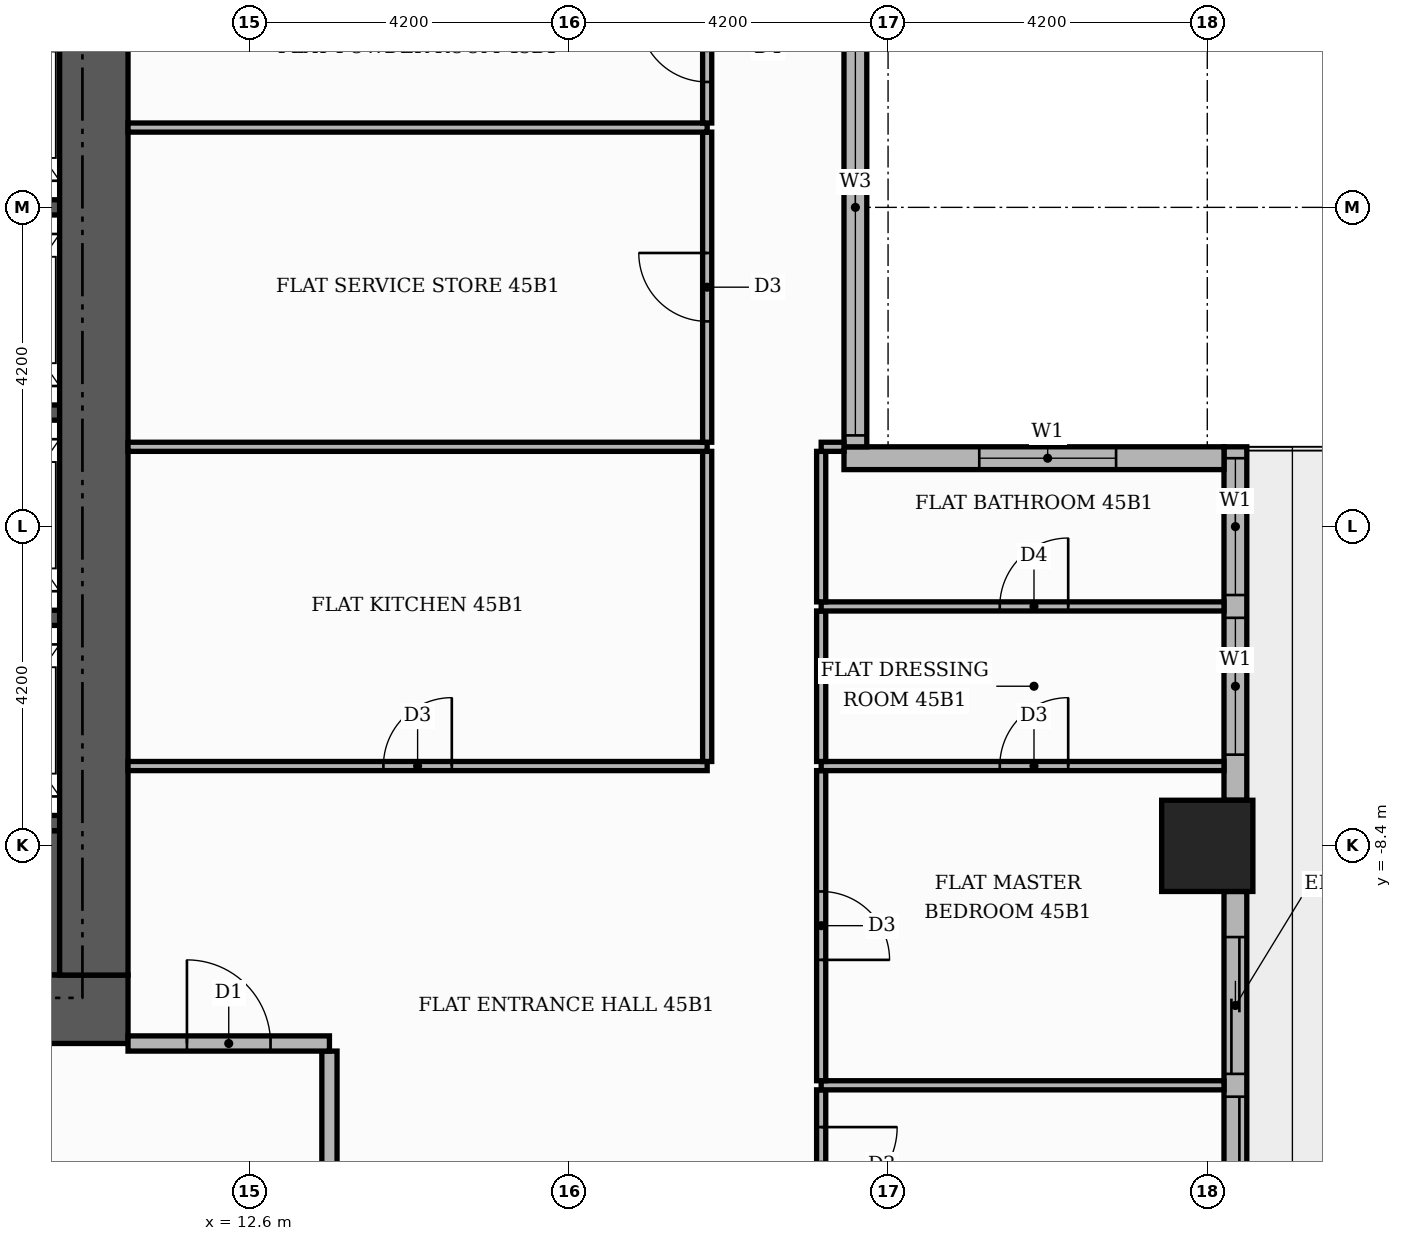
"""IFC4 building model, lengths in metres.
Left out: names, types, materials, properties, quantities, classifications, styles, units other than length and angle.
Written with IfcOpenShell. Run it as: python <this file> out.ifc"""

import sys

from ifc_helpers import new_model, si_unit, direction, frame, frame_2d, origin, origin_2d, place, context, subcontext, project, spatial, rectangle, extrude, element, fill, save


model = new_model("IFC4")
c1 = context("Model", 3, precision=1e-05, world=origin(), true_north=direction((0.0, 1.0)))
c2 = subcontext(c1, "Body", "Model", "MODEL_VIEW")
j1 = project(units=[si_unit("LENGTHUNIT", "METRE"), si_unit("PLANEANGLEUNIT", "RADIAN")], contexts=[c1])
p1 = place(None, origin())
s1 = spatial("IfcSite", under=j1, at=p1, CompositionType="ELEMENT")
p2 = place(p1, origin())
s2 = spatial("IfcBuilding", under=s1, at=p2, CompositionType="ELEMENT")
p3 = place(p2, frame((0.0, 0.0, 192.3)))
s3 = spatial("IfcBuildingStorey", under=s2, at=p3, CompositionType="ELEMENT", Elevation=192.3)
p4 = place(p3, frame((5.5, -9.15, 0.0), z_axis=(0.0, 0.0, 1.0), x_axis=(1.0, 0.0, 0.0)))
e1 = element("IfcWall", 1, at=p4, inside=s3, PredefinedType="SHEAR", context=c2, shape_type="SweptSolid", body=[
    extrude(rectangle(XDim=4.6, YDim=1.9, at=frame_2d((2.3, 0.0))), origin(), (0.0, 0.0, 1.0), 3.48),
])
for number, where, z_axis, x_axis in (
    (2, (8.1, -8.1, 0.0), (0.0, 0.0, 1.0), (1.0, 0.0, 0.0)),
    (3, (8.1, -5.4, 0.0), (0.0, 0.0, 1.0), (1.0, 0.0, 0.0)),
    (4, (8.1, -2.7, 0.0), (0.0, 0.0, 1.0), (1.0, 0.0, 0.0)),
    (5, (8.1, 0.0, 0.0), (0.0, 0.0, 1.0), (1.0, 0.0, 0.0)),
):
    element("IfcWall", number, at=place(p3, frame(where, z_axis=z_axis, x_axis=x_axis)), inside=s3, PredefinedType="SHEAR", context=c2, shape_type="SweptSolid", body=[
        extrude(rectangle(XDim=2.0, YDim=0.2, at=frame_2d((1.0, 0.0))), origin(), (0.0, 0.0, 1.0), 3.48),
    ])
p5 = place(p3, frame((-11.0, -10.55, 0.0), z_axis=(0.0, 0.0, 1.0), x_axis=(1.0, 0.0, 0.0)))
e6 = element("IfcWall", 6, at=p5, inside=s3, PredefinedType="SHEAR", context=c2, shape_type="SweptSolid", body=[
    extrude(rectangle(XDim=22.0, YDim=0.9, at=frame_2d((11.0, 0.0))), origin(), (0.0, 0.0, 1.0), 3.48),
])
p6 = place(p5, frame((7.4, 0.0, 0.0)))
e7 = element("IfcOpeningElement", 7, at=p6, cuts=e6, PredefinedType="OPENING", context=c2, shape_type="SweptSolid", body=[
    extrude(rectangle(XDim=1.8, YDim=2.2, at=frame_2d((0.9, 1.1))), frame((0.0, 0.46, 0.0), z_axis=(0.0, -1.0, 0.0), x_axis=(1.0, 0.0, 0.0)), (0.0, 0.0, 1.0), 0.92),
])
p7 = place(p3, frame((10.55, -10.1, 0.0), z_axis=(0.0, 0.0, 1.0), x_axis=(0.0, 1.0, 0.0)))
e8 = element("IfcWall", 8, at=p7, inside=s3, PredefinedType="SHEAR", context=c2, shape_type="SweptSolid", body=[
    extrude(rectangle(XDim=20.2, YDim=0.9, at=frame_2d((10.1, 0.0))), origin(), (0.0, 0.0, 1.0), 3.48),
])
p8 = place(p3, frame((25.2, -8.4, 0.0), z_axis=(0.0, 0.0, 1.0), x_axis=(1.0, 0.0, 0.0)))
e9 = element("IfcColumn", 9, at=p8, inside=s3, PredefinedType="COLUMN", context=c2, shape_type="SweptSolid", body=[
    extrude(rectangle(XDim=1.2, YDim=1.2, at=origin_2d()), origin(), (0.0, 0.0, 1.0), 3.9),
])
p9 = place(p3, frame((25.57, -16.2, 0.0), z_axis=(0.0, 0.0, 1.0), x_axis=(0.0, 1.0, 0.0)))
e10 = element("IfcWall", 10, at=p9, inside=s3, PredefinedType="STANDARD", context=c2, shape_type="SweptSolid", body=[
    extrude(rectangle(XDim=7.2, YDim=0.3, at=frame_2d((3.6, 0.0))), origin(), (0.0, 0.0, 1.0), 3.48),
])
p10 = place(p9, frame((0.6, 0.0, 0.0)))
e11 = element("IfcOpeningElement", 11, at=p10, cuts=e10, PredefinedType="OPENING", context=c2, shape_type="SweptSolid", body=[
    extrude(rectangle(XDim=3.9, YDim=2.4, at=frame_2d((1.95, 1.2))), frame((0.0, 0.16, 0.0), z_axis=(0.0, -1.0, 0.0), x_axis=(1.0, 0.0, 0.0)), (0.0, 0.0, 1.0), 0.32),
])
p11 = place(p9, frame((4.8, 0.0, 0.0)))
e12 = element("IfcOpeningElement", 12, at=p11, cuts=e10, PredefinedType="OPENING", context=c2, shape_type="SweptSolid", body=[
    extrude(rectangle(XDim=1.8, YDim=2.4, at=frame_2d((0.9, 1.2))), frame((0.0, 0.16, 0.0), z_axis=(0.0, -1.0, 0.0), x_axis=(1.0, 0.0, 0.0)), (0.0, 0.0, 1.0), 0.32),
])
p12 = place(p3, frame((25.57, -7.8, 0.0), z_axis=(0.0, 0.0, 1.0), x_axis=(0.0, 1.0, 0.0)))
e13 = element("IfcWall", 13, at=p12, inside=s3, PredefinedType="STANDARD", context=c2, shape_type="SweptSolid", body=[
    extrude(rectangle(XDim=4.65, YDim=0.3, at=frame_2d((2.325, 0.0))), origin(), (0.0, 0.0, 1.0), 3.48),
])
p13 = place(p12, frame((0.6, 0.0, 0.9)))
e14 = element("IfcOpeningElement", 14, at=p13, cuts=e13, PredefinedType="OPENING", context=c2, shape_type="SweptSolid", body=[
    extrude(rectangle(XDim=1.8, YDim=2.1, at=frame_2d((0.9, 1.05))), frame((0.0, 0.16, 0.0), z_axis=(0.0, -1.0, 0.0), x_axis=(1.0, 0.0, 0.0)), (0.0, 0.0, 1.0), 0.32),
])
p14 = place(p12, frame((2.7, 0.0, 0.9)))
e15 = element("IfcOpeningElement", 15, at=p14, cuts=e13, PredefinedType="OPENING", context=c2, shape_type="SweptSolid", body=[
    extrude(rectangle(XDim=1.8, YDim=2.1, at=frame_2d((0.9, 1.05))), frame((0.0, 0.16, 0.0), z_axis=(0.0, -1.0, 0.0), x_axis=(1.0, 0.0, 0.0)), (0.0, 0.0, 1.0), 0.32),
])
p15 = place(p3, frame((25.42, -3.3, 0.0), z_axis=(0.0, 0.0, 1.0), x_axis=(-1.0, 0.0, 0.0)))
e16 = element("IfcWall", 16, at=p15, inside=s3, PredefinedType="STANDARD", context=c2, shape_type="SweptSolid", body=[
    extrude(rectangle(XDim=5.0, YDim=0.3, at=frame_2d((2.5, 0.0))), origin(), (0.0, 0.0, 1.0), 3.48),
])
p16 = place(p15, frame((1.42, 0.0, 0.9)))
e17 = element("IfcOpeningElement", 17, at=p16, cuts=e16, PredefinedType="OPENING", context=c2, shape_type="SweptSolid", body=[
    extrude(rectangle(XDim=1.8, YDim=2.1, at=frame_2d((0.9, 1.05))), frame((0.0, 0.16, 0.0), z_axis=(0.0, -1.0, 0.0), x_axis=(1.0, 0.0, 0.0)), (0.0, 0.0, 1.0), 0.32),
])
p17 = place(p3, frame((20.57, -3.15, 0.0), z_axis=(0.0, 0.0, 1.0), x_axis=(0.0, 1.0, 0.0)))
e18 = element("IfcWall", 18, at=p17, inside=s3, PredefinedType="STANDARD", context=c2, shape_type="SweptSolid", body=[
    extrude(rectangle(XDim=6.6, YDim=0.3, at=frame_2d((3.3, 0.0))), origin(), (0.0, 0.0, 1.0), 3.48),
])
p18 = place(p17, frame((0.15, 0.0, 0.9)))
e19 = element("IfcOpeningElement", 19, at=p18, cuts=e18, PredefinedType="OPENING", context=c2, shape_type="SweptSolid", body=[
    extrude(rectangle(XDim=6.0, YDim=2.1, at=frame_2d((3.0, 1.05))), frame((0.0, 0.16, 0.0), z_axis=(0.0, -1.0, 0.0), x_axis=(1.0, 0.0, 0.0)), (0.0, 0.0, 1.0), 0.32),
])
p19 = place(p3, frame((20.12, -13.59, 0.0), z_axis=(0.0, 0.0, 1.0), x_axis=(0.0, 1.0, 0.0)))
e20 = element("IfcWall", 20, at=p19, inside=s3, PredefinedType="PARTITIONING", context=c2, shape_type="SweptSolid", body=[
    extrude(rectangle(XDim=1.98, YDim=0.12, at=frame_2d((0.99, 0.0))), origin(), (0.0, 0.0, 1.0), 3.48),
])
p20 = place(p19, frame((0.49, 0.0, 0.0)))
e21 = element("IfcOpeningElement", 21, at=p20, cuts=e20, PredefinedType="OPENING", context=c2, shape_type="SweptSolid", body=[
    extrude(rectangle(XDim=1.0, YDim=2.1, at=frame_2d((0.5, 1.05))), frame((0.0, 0.07, 0.0), z_axis=(0.0, -1.0, 0.0), x_axis=(1.0, 0.0, 0.0)), (0.0, 0.0, 1.0), 0.14),
])
p21 = place(p3, frame((13.65, -13.55, 0.0), z_axis=(0.0, 0.0, 1.0), x_axis=(0.0, 1.0, 0.0)))
e22 = element("IfcWall", 22, at=p21, inside=s3, PredefinedType="PARTITIONING", context=c2, shape_type="SweptSolid", body=[
    extrude(rectangle(XDim=2.45, YDim=0.2, at=frame_2d((1.225, 0.0))), origin(), (0.0, 0.0, 1.0), 3.48),
])
p22 = place(p3, frame((20.12, -11.55, 0.0), z_axis=(0.0, 0.0, 1.0), x_axis=(1.0, 0.0, 0.0)))
e23 = element("IfcWall", 23, at=p22, inside=s3, PredefinedType="PARTITIONING", context=c2, shape_type="SweptSolid", body=[
    extrude(rectangle(XDim=5.3, YDim=0.12, at=frame_2d((2.65, 0.0))), origin(), (0.0, 0.0, 1.0), 3.48),
])
p23 = place(p3, frame((20.12, -11.49, 0.0), z_axis=(0.0, 0.0, 1.0), x_axis=(0.0, 1.0, 0.0)))
e24 = element("IfcWall", 24, at=p23, inside=s3, PredefinedType="PARTITIONING", context=c2, shape_type="SweptSolid", body=[
    extrude(rectangle(XDim=4.08, YDim=0.12, at=frame_2d((2.04, 0.0))), origin(), (0.0, 0.0, 1.0), 3.48),
])
p24 = place(p23, frame((1.59, 0.0, 0.0)))
e25 = element("IfcOpeningElement", 25, at=p24, cuts=e24, PredefinedType="OPENING", context=c2, shape_type="SweptSolid", body=[
    extrude(rectangle(XDim=0.9, YDim=2.1, at=frame_2d((0.45, 1.05))), frame((0.0, 0.07, 0.0), z_axis=(0.0, -1.0, 0.0), x_axis=(1.0, 0.0, 0.0)), (0.0, 0.0, 1.0), 0.14),
])
p25 = place(p3, frame((11.0, -11.0, 0.0), z_axis=(0.0, 0.0, 1.0), x_axis=(1.0, 0.0, 0.0)))
e26 = element("IfcWall", 26, at=p25, inside=s3, PredefinedType="PARTITIONING", context=c2, shape_type="SweptSolid", body=[
    extrude(rectangle(XDim=2.65, YDim=0.2, at=frame_2d((1.325, 0.0))), origin(), (0.0, 0.0, 1.0), 3.48),
])
p26 = place(p25, frame((0.775, 0.0, 0.0)))
e27 = element("IfcOpeningElement", 27, at=p26, cuts=e26, PredefinedType="OPENING", context=c2, shape_type="SweptSolid", body=[
    extrude(rectangle(XDim=1.1, YDim=2.4, at=frame_2d((0.55, 1.2))), frame((0.0, 0.11, 0.0), z_axis=(0.0, -1.0, 0.0), x_axis=(1.0, 0.0, 0.0)), (0.0, 0.0, 1.0), 0.22),
])
p27 = place(p3, frame((11.0, -7.35, 0.0), z_axis=(0.0, 0.0, 1.0), x_axis=(1.0, 0.0, 0.0)))
e28 = element("IfcWall", 28, at=p27, inside=s3, PredefinedType="PARTITIONING", context=c2, shape_type="SweptSolid", body=[
    extrude(rectangle(XDim=7.62, YDim=0.12, at=frame_2d((3.81, 0.0))), origin(), (0.0, 0.0, 1.0), 3.48),
])
p28 = place(p27, frame((3.36, 0.0, 0.0)))
e29 = element("IfcOpeningElement", 29, at=p28, cuts=e28, PredefinedType="OPENING", context=c2, shape_type="SweptSolid", body=[
    extrude(rectangle(XDim=0.9, YDim=2.1, at=frame_2d((0.45, 1.05))), frame((0.0, 0.07, 0.0), z_axis=(0.0, -1.0, 0.0), x_axis=(1.0, 0.0, 0.0)), (0.0, 0.0, 1.0), 0.14),
])
p29 = place(p3, frame((20.12, -7.35, 0.0), z_axis=(0.0, 0.0, 1.0), x_axis=(1.0, 0.0, 0.0)))
e30 = element("IfcWall", 30, at=p29, inside=s3, PredefinedType="PARTITIONING", context=c2, shape_type="SweptSolid", body=[
    extrude(rectangle(XDim=5.3, YDim=0.12, at=frame_2d((2.65, 0.0))), origin(), (0.0, 0.0, 1.0), 3.48),
])
p30 = place(p29, frame((2.35, 0.0, 0.0)))
e31 = element("IfcOpeningElement", 31, at=p30, cuts=e30, PredefinedType="OPENING", context=c2, shape_type="SweptSolid", body=[
    extrude(rectangle(XDim=0.9, YDim=2.1, at=frame_2d((0.45, 1.05))), frame((0.0, 0.07, 0.0), z_axis=(0.0, -1.0, 0.0), x_axis=(1.0, 0.0, 0.0)), (0.0, 0.0, 1.0), 0.14),
])
p31 = place(p3, frame((18.62, -7.29, 0.0), z_axis=(0.0, 0.0, 1.0), x_axis=(0.0, 1.0, 0.0)))
e32 = element("IfcWall", 32, at=p31, inside=s3, PredefinedType="PARTITIONING", context=c2, shape_type="SweptSolid", body=[
    extrude(rectangle(XDim=4.08, YDim=0.12, at=frame_2d((2.04, 0.0))), origin(), (0.0, 0.0, 1.0), 3.48),
])
p32 = place(p3, frame((20.12, -7.29, 0.0), z_axis=(0.0, 0.0, 1.0), x_axis=(0.0, 1.0, 0.0)))
e33 = element("IfcWall", 33, at=p32, inside=s3, PredefinedType="PARTITIONING", context=c2, shape_type="SweptSolid", body=[
    extrude(rectangle(XDim=1.98, YDim=0.12, at=frame_2d((0.99, 0.0))), origin(), (0.0, 0.0, 1.0), 3.48),
])
p33 = place(p3, frame((20.12, -5.25, 0.0), z_axis=(0.0, 0.0, 1.0), x_axis=(1.0, 0.0, 0.0)))
e34 = element("IfcWall", 34, at=p33, inside=s3, PredefinedType="PARTITIONING", context=c2, shape_type="SweptSolid", body=[
    extrude(rectangle(XDim=5.3, YDim=0.12, at=frame_2d((2.65, 0.0))), origin(), (0.0, 0.0, 1.0), 3.48),
])
p34 = place(p33, frame((2.35, 0.0, 0.0)))
e35 = element("IfcOpeningElement", 35, at=p34, cuts=e34, PredefinedType="OPENING", context=c2, shape_type="SweptSolid", body=[
    extrude(rectangle(XDim=0.9, YDim=2.1, at=frame_2d((0.45, 1.05))), frame((0.0, 0.07, 0.0), z_axis=(0.0, -1.0, 0.0), x_axis=(1.0, 0.0, 0.0)), (0.0, 0.0, 1.0), 0.14),
])
p35 = place(p3, frame((20.12, -5.19, 0.0), z_axis=(0.0, 0.0, 1.0), x_axis=(0.0, 1.0, 0.0)))
e36 = element("IfcWall", 36, at=p35, inside=s3, PredefinedType="PARTITIONING", context=c2, shape_type="SweptSolid", body=[
    extrude(rectangle(XDim=1.98, YDim=0.12, at=frame_2d((0.99, 0.0))), origin(), (0.0, 0.0, 1.0), 3.48),
])
p36 = place(p3, frame((11.0, -3.15, 0.0), z_axis=(0.0, 0.0, 1.0), x_axis=(1.0, 0.0, 0.0)))
e37 = element("IfcWall", 37, at=p36, inside=s3, PredefinedType="PARTITIONING", context=c2, shape_type="SweptSolid", body=[
    extrude(rectangle(XDim=7.62, YDim=0.12, at=frame_2d((3.81, 0.0))), origin(), (0.0, 0.0, 1.0), 3.48),
])
p37 = place(p3, frame((20.12, -3.15, 0.0), z_axis=(0.0, 0.0, 1.0), x_axis=(1.0, 0.0, 0.0)))
e38 = element("IfcWall", 38, at=p37, inside=s3, PredefinedType="PARTITIONING", context=c2, shape_type="SweptSolid", body=[
    extrude(rectangle(XDim=0.3, YDim=0.12, at=frame_2d((0.15, 0.0))), origin(), (0.0, 0.0, 1.0), 3.48),
])
p38 = place(p3, frame((18.62, -3.09, 0.0), z_axis=(0.0, 0.0, 1.0), x_axis=(0.0, 1.0, 0.0)))
e39 = element("IfcWall", 39, at=p38, inside=s3, PredefinedType="PARTITIONING", context=c2, shape_type="SweptSolid", body=[
    extrude(rectangle(XDim=4.08, YDim=0.12, at=frame_2d((2.04, 0.0))), origin(), (0.0, 0.0, 1.0), 3.48),
])
p39 = place(p38, frame((1.59, 0.0, 0.0)))
e40 = element("IfcOpeningElement", 40, at=p39, cuts=e39, PredefinedType="OPENING", context=c2, shape_type="SweptSolid", body=[
    extrude(rectangle(XDim=0.9, YDim=2.1, at=frame_2d((0.45, 1.05))), frame((0.0, 0.07, 0.0), z_axis=(0.0, -1.0, 0.0), x_axis=(1.0, 0.0, 0.0)), (0.0, 0.0, 1.0), 0.14),
])
p40 = place(p3, frame((11.0, 1.05, 0.0), z_axis=(0.0, 0.0, 1.0), x_axis=(1.0, 0.0, 0.0)))
e41 = element("IfcWall", 41, at=p40, inside=s3, PredefinedType="PARTITIONING", context=c2, shape_type="SweptSolid", body=[
    extrude(rectangle(XDim=7.62, YDim=0.12, at=frame_2d((3.81, 0.0))), origin(), (0.0, 0.0, 1.0), 3.48),
])
p41 = place(p3, frame((18.62, 1.11, 0.0), z_axis=(0.0, 0.0, 1.0), x_axis=(0.0, 1.0, 0.0)))
e42 = element("IfcWall", 42, at=p41, inside=s3, PredefinedType="PARTITIONING", context=c2, shape_type="SweptSolid", body=[
    extrude(rectangle(XDim=1.98, YDim=0.12, at=frame_2d((0.99, 0.0))), origin(), (0.0, 0.0, 1.0), 3.48),
])
p42 = place(p41, frame((0.54, 0.0, 0.0)))
e43 = element("IfcOpeningElement", 43, at=p42, cuts=e42, PredefinedType="OPENING", context=c2, shape_type="SweptSolid", body=[
    extrude(rectangle(XDim=0.9, YDim=2.1, at=frame_2d((0.45, 1.05))), frame((0.0, 0.07, 0.0), z_axis=(0.0, -1.0, 0.0), x_axis=(1.0, 0.0, 0.0)), (0.0, 0.0, 1.0), 0.14),
])
p43 = place(p10, origin())
e44 = element("IfcDoor", 44, at=p43, inside=s3, OperationType="SLIDING_TO_LEFT", PredefinedType="DOOR", context=c2, shape_type="SweptSolid", body=[
    extrude(rectangle(XDim=3.9, YDim=2.4, at=frame_2d((1.95, 1.2))), frame((0.0, 0.025, 0.0), z_axis=(0.0, -1.0, 0.0), x_axis=(1.0, 0.0, 0.0)), (0.0, 0.0, 1.0), 0.05),
])
fill(e11, e44)
p44 = place(p11, origin())
e45 = element("IfcDoor", 45, at=p44, inside=s3, OperationType="SLIDING_TO_RIGHT", PredefinedType="DOOR", context=c2, shape_type="SweptSolid", body=[
    extrude(rectangle(XDim=1.8, YDim=2.4, at=frame_2d((0.9, 1.2))), frame((0.0, 0.025, 0.0), z_axis=(0.0, -1.0, 0.0), x_axis=(1.0, 0.0, 0.0)), (0.0, 0.0, 1.0), 0.05),
])
fill(e12, e45)
p45 = place(p13, origin())
e46 = element("IfcWindow", 46, at=p45, inside=s3, PartitioningType="SINGLE_PANEL", PredefinedType="WINDOW", context=c2, shape_type="SweptSolid", body=[
    extrude(rectangle(XDim=1.8, YDim=2.1, at=frame_2d((0.9, 1.05))), frame((0.0, 0.03, 0.0), z_axis=(0.0, -1.0, 0.0), x_axis=(1.0, 0.0, 0.0)), (0.0, 0.0, 1.0), 0.06),
])
fill(e14, e46)
p46 = place(p14, origin())
e47 = element("IfcWindow", 47, at=p46, inside=s3, PartitioningType="SINGLE_PANEL", PredefinedType="WINDOW", context=c2, shape_type="SweptSolid", body=[
    extrude(rectangle(XDim=1.8, YDim=2.1, at=frame_2d((0.9, 1.05))), frame((0.0, 0.03, 0.0), z_axis=(0.0, -1.0, 0.0), x_axis=(1.0, 0.0, 0.0)), (0.0, 0.0, 1.0), 0.06),
])
fill(e15, e47)
p47 = place(p16, origin())
e48 = element("IfcWindow", 48, at=p47, inside=s3, PartitioningType="SINGLE_PANEL", PredefinedType="WINDOW", context=c2, shape_type="SweptSolid", body=[
    extrude(rectangle(XDim=1.8, YDim=2.1, at=frame_2d((0.9, 1.05))), frame((0.0, 0.03, 0.0), z_axis=(0.0, -1.0, 0.0), x_axis=(1.0, 0.0, 0.0)), (0.0, 0.0, 1.0), 0.06),
])
fill(e17, e48)
p48 = place(p18, origin())
e49 = element("IfcWindow", 49, at=p48, inside=s3, PartitioningType="SINGLE_PANEL", PredefinedType="WINDOW", context=c2, shape_type="SweptSolid", body=[
    extrude(rectangle(XDim=6.0, YDim=2.1, at=frame_2d((3.0, 1.05))), frame((0.0, 0.03, 0.0), z_axis=(0.0, -1.0, 0.0), x_axis=(1.0, 0.0, 0.0)), (0.0, 0.0, 1.0), 0.06),
])
fill(e19, e49)
p49 = place(p26, origin())
e50 = element("IfcDoor", 50, at=p49, inside=s3, OperationType="SINGLE_SWING_LEFT", PredefinedType="DOOR", context=c2, shape_type="SweptSolid", body=[
    extrude(rectangle(XDim=1.1, YDim=2.4, at=frame_2d((0.55, 1.2))), frame((0.0, 0.025, 0.0), z_axis=(0.0, -1.0, 0.0), x_axis=(1.0, 0.0, 0.0)), (0.0, 0.0, 1.0), 0.05),
])
fill(e27, e50)
p50 = place(p28, origin())
e51 = element("IfcDoor", 51, at=p50, inside=s3, OperationType="SINGLE_SWING_RIGHT", PredefinedType="DOOR", context=c2, shape_type="SweptSolid", body=[
    extrude(rectangle(XDim=0.9, YDim=2.1, at=frame_2d((0.45, 1.05))), frame((0.0, 0.025, 0.0), z_axis=(0.0, -1.0, 0.0), x_axis=(1.0, 0.0, 0.0)), (0.0, 0.0, 1.0), 0.05),
])
fill(e29, e51)
p51 = place(p39, origin())
e52 = element("IfcDoor", 52, at=p51, inside=s3, OperationType="SINGLE_SWING_RIGHT", PredefinedType="DOOR", context=c2, shape_type="SweptSolid", body=[
    extrude(rectangle(XDim=0.9, YDim=2.1, at=frame_2d((0.45, 1.05))), frame((0.0, 0.025, 0.0), z_axis=(0.0, -1.0, 0.0), x_axis=(1.0, 0.0, 0.0)), (0.0, 0.0, 1.0), 0.05),
])
fill(e40, e52)
p52 = place(p42, origin())
e53 = element("IfcDoor", 53, at=p52, inside=s3, OperationType="SINGLE_SWING_RIGHT", PredefinedType="DOOR", context=c2, shape_type="SweptSolid", body=[
    extrude(rectangle(XDim=0.9, YDim=2.1, at=frame_2d((0.45, 1.05))), frame((0.0, 0.025, 0.0), z_axis=(0.0, -1.0, 0.0), x_axis=(1.0, 0.0, 0.0)), (0.0, 0.0, 1.0), 0.05),
])
fill(e43, e53)
p53 = place(p20, frame((1.0, 0.0, 0.0), z_axis=(0.0, 0.0, 1.0), x_axis=(-1.0, 0.0, 0.0)))
e54 = element("IfcDoor", 54, at=p53, inside=s3, OperationType="SINGLE_SWING_RIGHT", PredefinedType="DOOR", context=c2, shape_type="SweptSolid", body=[
    extrude(rectangle(XDim=1.0, YDim=2.1, at=frame_2d((0.5, 1.05))), frame((0.0, 0.025, 0.0), z_axis=(0.0, -1.0, 0.0), x_axis=(1.0, 0.0, 0.0)), (0.0, 0.0, 1.0), 0.05),
])
fill(e21, e54)
p54 = place(p24, frame((0.9, 0.0, 0.0), z_axis=(0.0, 0.0, 1.0), x_axis=(-1.0, 0.0, 0.0)))
e55 = element("IfcDoor", 55, at=p54, inside=s3, OperationType="SINGLE_SWING_LEFT", PredefinedType="DOOR", context=c2, shape_type="SweptSolid", body=[
    extrude(rectangle(XDim=0.9, YDim=2.1, at=frame_2d((0.45, 1.05))), frame((0.0, 0.025, 0.0), z_axis=(0.0, -1.0, 0.0), x_axis=(1.0, 0.0, 0.0)), (0.0, 0.0, 1.0), 0.05),
])
fill(e25, e55)
p55 = place(p30, origin())
e56 = element("IfcDoor", 56, at=p55, inside=s3, OperationType="SINGLE_SWING_RIGHT", PredefinedType="DOOR", context=c2, shape_type="SweptSolid", body=[
    extrude(rectangle(XDim=0.9, YDim=2.1, at=frame_2d((0.45, 1.05))), frame((0.0, 0.025, 0.0), z_axis=(0.0, -1.0, 0.0), x_axis=(1.0, 0.0, 0.0)), (0.0, 0.0, 1.0), 0.05),
])
fill(e31, e56)
p56 = place(p34, origin())
e57 = element("IfcDoor", 57, at=p56, inside=s3, OperationType="SINGLE_SWING_RIGHT", PredefinedType="DOOR", context=c2, shape_type="SweptSolid", body=[
    extrude(rectangle(XDim=0.9, YDim=2.1, at=frame_2d((0.45, 1.05))), frame((0.0, 0.025, 0.0), z_axis=(0.0, -1.0, 0.0), x_axis=(1.0, 0.0, 0.0)), (0.0, 0.0, 1.0), 0.05),
])
fill(e35, e57)
save(model, sys.argv[1])
